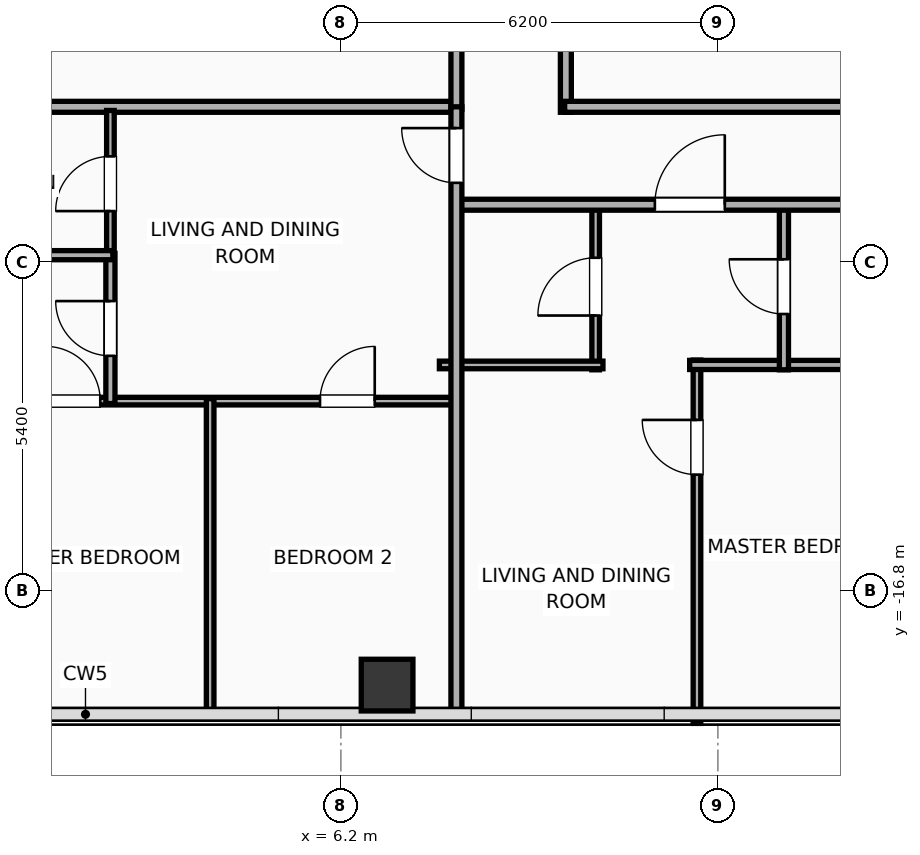
"""IFC4 building model, lengths in metres.
Left out: names, types, materials, properties, quantities, classifications, styles, units other than length and angle.
Written with IfcOpenShell. Run it as: python <this file> out.ifc"""

import sys

from ifc_helpers import new_model, si_unit, direction, frame, frame_2d, origin, origin_2d, place, context, subcontext, project, spatial, rectangle, hollow_rectangle, extrude, element, fill, save


model = new_model("IFC4")
c1 = context("Model", 3, precision=1e-05, world=origin(), true_north=direction((0.0, 1.0)))
c2 = subcontext(c1, "Body", "Model", "MODEL_VIEW")
j1 = project(units=[si_unit("LENGTHUNIT", "METRE"), si_unit("PLANEANGLEUNIT", "RADIAN")], contexts=[c1])
p1 = place(None, origin())
s1 = spatial("IfcSite", under=j1, at=p1, CompositionType="ELEMENT")
p2 = place(p1, origin())
s2 = spatial("IfcBuilding", under=s1, at=p2, CompositionType="ELEMENT")
p3 = place(p2, frame((0.0, 0.0, 204.1)))
s3 = spatial("IfcBuildingStorey", under=s2, at=p3, CompositionType="ELEMENT", Elevation=204.1)
p4 = place(p3, frame((6.96, -18.35, 0.0), z_axis=(0.0, 0.0, 1.0), x_axis=(1.0, 0.0, 0.0)))
e1 = element("IfcColumn", 1, at=p4, inside=s3, PredefinedType="COLUMN", context=c2, shape_type="SweptSolid", body=[
    extrude(hollow_rectangle(XDim=0.85, YDim=0.85, WallThickness=0.028, at=origin_2d()), origin(), (0.0, 0.0, 1.0), 3.9),
])
p5 = place(p3, frame((9.9, -8.93, 0.0), z_axis=(0.0, 0.0, 1.0), x_axis=(0.0, 1.0, 0.0)))
e2 = element("IfcWall", 2, at=p5, inside=s3, PredefinedType="PARTITIONING", context=c2, shape_type="SweptSolid", body=[
    extrude(rectangle(XDim=17.86, YDim=0.18, at=frame_2d((8.93, 0.0))), origin(), (0.0, 0.0, 1.0), 3.65),
])
p6 = place(p5, frame((7.487, 0.0, 0.0)))
e3 = element("IfcOpeningElement", 3, at=p6, cuts=e2, PredefinedType="OPENING", context=c2, shape_type="SweptSolid", body=[
    extrude(rectangle(XDim=1.1, YDim=2.05, at=frame_2d((0.55, 1.025))), frame((0.0, 0.1, 0.0), z_axis=(0.0, -1.0, 0.0), x_axis=(1.0, 0.0, 0.0)), (0.0, 0.0, 1.0), 0.2),
])
p7 = place(p3, frame((9.88, -8.84, 0.0), z_axis=(0.0, 0.0, 1.0), x_axis=(1.0, 0.0, 0.0)))
e4 = element("IfcWall", 4, at=p7, inside=s3, PredefinedType="PARTITIONING", context=c2, shape_type="SweptSolid", body=[
    extrude(rectangle(XDim=20.35, YDim=0.18, at=frame_2d((10.175, 0.0))), origin(), (0.0, 0.0, 1.0), 3.65),
])
p8 = place(p3, frame((-8.15, -8.84, 0.0), z_axis=(0.0, 0.0, 1.0), x_axis=(1.0, 0.0, 0.0)))
e5 = element("IfcWall", 5, at=p8, inside=s3, PredefinedType="PARTITIONING", context=c2, shape_type="SweptSolid", body=[
    extrude(rectangle(XDim=16.3, YDim=0.18, at=frame_2d((8.15, 0.0))), origin(), (0.0, 0.0, 1.0), 3.65),
])
p9 = place(p3, frame((8.1, -8.88, 0.0), z_axis=(0.0, 0.0, 1.0), x_axis=(0.0, 1.0, 0.0)))
e6 = element("IfcWall", 6, at=p9, inside=s3, PredefinedType="PARTITIONING", context=c2, shape_type="SweptSolid", body=[
    extrude(rectangle(XDim=17.76, YDim=0.18, at=frame_2d((8.88, 0.0))), origin(), (0.0, 0.0, 1.0), 3.65),
])
p10 = place(p3, frame((12.056, -18.98, 0.0), z_axis=(0.0, 0.0, 1.0), x_axis=(0.0, 1.0, 0.0)))
e7 = element("IfcWall", 7, at=p10, inside=s3, PredefinedType="PARTITIONING", context=c2, shape_type="SweptSolid", body=[
    extrude(rectangle(XDim=5.975, YDim=0.125, at=frame_2d((2.988, 0.0))), origin(), (0.0, 0.0, 1.0), 3.65),
])
p11 = place(p10, frame((4.091, 0.0, 0.0)))
e8 = element("IfcOpeningElement", 8, at=p11, cuts=e7, PredefinedType="OPENING", context=c2, shape_type="SweptSolid", body=[
    extrude(rectangle(XDim=0.9, YDim=2.05, at=frame_2d((0.45, 1.025))), frame((0.0, 0.073, 0.0), z_axis=(0.0, -1.0, 0.0), x_axis=(1.0, 0.0, 0.0)), (0.0, 0.0, 1.0), 0.145),
])
p12 = place(p3, frame((11.936, -13.085, 0.0), z_axis=(0.0, 0.0, 1.0), x_axis=(1.0, 0.0, 0.0)))
e9 = element("IfcWall", 9, at=p12, inside=s3, PredefinedType="PLUMBINGWALL", context=c2, shape_type="SweptSolid", body=[
    extrude(rectangle(XDim=3.79, YDim=0.15, at=frame_2d((1.895, 0.0))), origin(), (0.0, 0.0, 1.0), 3.65),
])
p13 = place(p3, frame((10.39, -13.165, 0.0), z_axis=(0.0, 0.0, 1.0), x_axis=(0.0, 1.0, 0.0)))
e10 = element("IfcWall", 10, at=p13, inside=s3, PredefinedType="PARTITIONING", context=c2, shape_type="SweptSolid", body=[
    extrude(rectangle(XDim=2.735, YDim=0.125, at=frame_2d((1.368, 0.0))), origin(), (0.0, 0.0, 1.0), 3.65),
])
p14 = place(p13, frame((0.893, 0.0, 0.0)))
e11 = element("IfcOpeningElement", 11, at=p14, cuts=e10, PredefinedType="OPENING", context=c2, shape_type="SweptSolid", body=[
    extrude(rectangle(XDim=0.95, YDim=2.05, at=frame_2d((0.475, 1.025))), frame((0.0, 0.073, 0.0), z_axis=(0.0, -1.0, 0.0), x_axis=(1.0, 0.0, 0.0)), (0.0, 0.0, 1.0), 0.145),
])
p15 = place(p3, frame((7.82, -13.085, 0.0), z_axis=(0.0, 0.0, 1.0), x_axis=(1.0, 0.0, 0.0)))
e12 = element("IfcWall", 12, at=p15, inside=s3, PredefinedType="PARTITIONING", context=c2, shape_type="SweptSolid", body=[
    extrude(rectangle(XDim=2.69, YDim=0.125, at=frame_2d((1.345, 0.0))), origin(), (0.0, 0.0, 1.0), 3.65),
])
p16 = place(p3, frame((13.486, -13.165, 0.0), z_axis=(0.0, 0.0, 1.0), x_axis=(0.0, 1.0, 0.0)))
e13 = element("IfcWall", 13, at=p16, inside=s3, PredefinedType="PLUMBINGWALL", context=c2, shape_type="SweptSolid", body=[
    extrude(rectangle(XDim=2.735, YDim=0.15, at=frame_2d((1.368, 0.0))), origin(), (0.0, 0.0, 1.0), 3.65),
])
p17 = place(p16, frame((0.917, 0.0, 0.0)))
e14 = element("IfcOpeningElement", 14, at=p17, cuts=e13, PredefinedType="OPENING", context=c2, shape_type="SweptSolid", body=[
    extrude(rectangle(XDim=0.9, YDim=2.05, at=frame_2d((0.45, 1.025))), frame((0.0, 0.085, 0.0), z_axis=(0.0, -1.0, 0.0), x_axis=(1.0, 0.0, 0.0)), (0.0, 0.0, 1.0), 0.17),
])
p18 = place(p3, frame((8.08, -10.45, 0.0), z_axis=(0.0, 0.0, 1.0), x_axis=(1.0, 0.0, 0.0)))
e15 = element("IfcWall", 15, at=p18, inside=s3, PredefinedType="PARTITIONING", context=c2, shape_type="SweptSolid", body=[
    extrude(rectangle(XDim=22.15, YDim=0.18, at=frame_2d((11.075, 0.0))), origin(), (0.0, 0.0, 1.0), 3.65),
])
p19 = place(p18, frame((3.283, 0.0, 0.0)))
e16 = element("IfcOpeningElement", 16, at=p19, cuts=e15, PredefinedType="OPENING", context=c2, shape_type="SweptSolid", body=[
    extrude(rectangle(XDim=1.15, YDim=2.05, at=frame_2d((0.575, 1.025))), frame((0.0, 0.1, 0.0), z_axis=(0.0, -1.0, 0.0), x_axis=(1.0, 0.0, 0.0)), (0.0, 0.0, 1.0), 0.2),
])
p20 = place(p18, frame((10.668, 0.0, 0.0)))
e17 = element("IfcOpeningElement", 17, at=p20, cuts=e15, PredefinedType="OPENING", context=c2, shape_type="SweptSolid", body=[
    extrude(rectangle(XDim=1.15, YDim=2.05, at=frame_2d((0.575, 1.025))), frame((0.0, 0.1, 0.0), z_axis=(0.0, -1.0, 0.0), x_axis=(1.0, 0.0, 0.0)), (0.0, 0.0, 1.0), 0.2),
])
p21 = place(p18, frame((18.084, 0.0, 0.0)))
e18 = element("IfcOpeningElement", 18, at=p21, cuts=e15, PredefinedType="OPENING", context=c2, shape_type="SweptSolid", body=[
    extrude(rectangle(XDim=1.15, YDim=2.05, at=frame_2d((0.575, 1.025))), frame((0.0, 0.1, 0.0), z_axis=(0.0, -1.0, 0.0), x_axis=(1.0, 0.0, 0.0)), (0.0, 0.0, 1.0), 0.2),
])
p22 = place(p3, frame((0.02, -13.68, 0.0), z_axis=(0.0, 0.0, 1.0), x_axis=(1.0, 0.0, 0.0)))
e19 = element("IfcWall", 19, at=p22, inside=s3, PredefinedType="PARTITIONING", context=c2, shape_type="SweptSolid", body=[
    extrude(rectangle(XDim=8.06, YDim=0.125, at=frame_2d((4.03, 0.0))), origin(), (0.0, 0.0, 1.0), 3.65),
])
p23 = place(p22, frame((1.323, 0.0, 0.0)))
e20 = element("IfcOpeningElement", 20, at=p23, cuts=e19, PredefinedType="OPENING", context=c2, shape_type="SweptSolid", body=[
    extrude(rectangle(XDim=0.9, YDim=2.05, at=frame_2d((0.45, 1.025))), frame((0.0, 0.073, 0.0), z_axis=(0.0, -1.0, 0.0), x_axis=(1.0, 0.0, 0.0)), (0.0, 0.0, 1.0), 0.145),
])
p24 = place(p22, frame((5.837, 0.0, 0.0)))
e21 = element("IfcOpeningElement", 21, at=p24, cuts=e19, PredefinedType="OPENING", context=c2, shape_type="SweptSolid", body=[
    extrude(rectangle(XDim=0.9, YDim=2.05, at=frame_2d((0.45, 1.025))), frame((0.0, 0.073, 0.0), z_axis=(0.0, -1.0, 0.0), x_axis=(1.0, 0.0, 0.0)), (0.0, 0.0, 1.0), 0.145),
])
p25 = place(p3, frame((2.41, -11.31, 0.0), z_axis=(0.0, 0.0, 1.0), x_axis=(0.0, 1.0, 0.0)))
e22 = element("IfcWall", 22, at=p25, inside=s3, PredefinedType="PARTITIONING", context=c2, shape_type="SweptSolid", body=[
    extrude(rectangle(XDim=2.41, YDim=0.125, at=frame_2d((1.205, 0.0))), origin(), (0.0, 0.0, 1.0), 3.65),
])
p26 = place(p25, frame((0.755, 0.0, 0.0)))
e23 = element("IfcOpeningElement", 23, at=p26, cuts=e22, PredefinedType="OPENING", context=c2, shape_type="SweptSolid", body=[
    extrude(rectangle(XDim=0.9, YDim=2.05, at=frame_2d((0.45, 1.025))), frame((0.0, 0.073, 0.0), z_axis=(0.0, -1.0, 0.0), x_axis=(1.0, 0.0, 0.0)), (0.0, 0.0, 1.0), 0.145),
])
p27 = place(p3, frame((2.41, -13.72, 0.0), z_axis=(0.0, 0.0, 1.0), x_axis=(0.0, 1.0, 0.0)))
e24 = element("IfcWall", 24, at=p27, inside=s3, PredefinedType="PLUMBINGWALL", context=c2, shape_type="SweptSolid", body=[
    extrude(rectangle(XDim=2.47, YDim=0.15, at=frame_2d((1.235, 0.0))), origin(), (0.0, 0.0, 1.0), 3.65),
])
p28 = place(p27, frame((0.785, 0.0, 0.0)))
e25 = element("IfcOpeningElement", 25, at=p28, cuts=e24, PredefinedType="OPENING", context=c2, shape_type="SweptSolid", body=[
    extrude(rectangle(XDim=0.9, YDim=2.05, at=frame_2d((0.45, 1.025))), frame((0.0, 0.085, 0.0), z_axis=(0.0, -1.0, 0.0), x_axis=(1.0, 0.0, 0.0)), (0.0, 0.0, 1.0), 0.17),
])
p29 = place(p3, frame((0.02, -11.28, 0.0), z_axis=(0.0, 0.0, 1.0), x_axis=(1.0, 0.0, 0.0)))
e26 = element("IfcWall", 26, at=p29, inside=s3, PredefinedType="PLUMBINGWALL", context=c2, shape_type="SweptSolid", body=[
    extrude(rectangle(XDim=2.43, YDim=0.15, at=frame_2d((1.215, 0.0))), origin(), (0.0, 0.0, 1.0), 3.65),
])
p30 = place(p3, frame((4.05, -18.83, 0.0), z_axis=(0.0, 0.0, 1.0), x_axis=(0.0, 1.0, 0.0)))
e27 = element("IfcWall", 27, at=p30, inside=s3, PredefinedType="PARTITIONING", context=c2, shape_type="SweptSolid", body=[
    extrude(rectangle(XDim=5.19, YDim=0.125, at=frame_2d((2.595, 0.0))), origin(), (0.0, 0.0, 1.0), 3.65),
])
p31 = place(p3, frame((8.1, -18.83, 0.0), z_axis=(0.0, 0.0, 1.0), x_axis=(0.0, 1.0, 0.0)))
e28 = element("IfcWall", 28, at=p31, inside=s3, PredefinedType="PARTITIONING", context=c2, shape_type="SweptSolid", body=[
    extrude(rectangle(XDim=9.99, YDim=0.18, at=frame_2d((4.995, 0.0))), origin(), (0.0, 0.0, 1.0), 3.65),
])
p32 = place(p31, frame((8.74, 0.0, 0.0)))
e29 = element("IfcOpeningElement", 29, at=p32, cuts=e28, PredefinedType="OPENING", context=c2, shape_type="SweptSolid", body=[
    extrude(rectangle(XDim=0.9, YDim=2.05, at=frame_2d((0.45, 1.025))), frame((0.0, 0.1, 0.0), z_axis=(0.0, -1.0, 0.0), x_axis=(1.0, 0.0, 0.0)), (0.0, 0.0, 1.0), 0.2),
])
p33 = place(p11, origin())
e30 = element("IfcDoor", 30, at=p33, inside=s3, OperationType="SINGLE_SWING_RIGHT", PredefinedType="DOOR", context=c2, shape_type="SweptSolid", body=[
    extrude(rectangle(XDim=0.9, YDim=2.05, at=frame_2d((0.45, 1.025))), frame((0.0, 0.025, 0.0), z_axis=(0.0, -1.0, 0.0), x_axis=(1.0, 0.0, 0.0)), (0.0, 0.0, 1.0), 0.05),
])
fill(e8, e30)
p34 = place(p14, origin())
e31 = element("IfcDoor", 31, at=p34, inside=s3, OperationType="SINGLE_SWING_LEFT", PredefinedType="DOOR", context=c2, shape_type="SweptSolid", body=[
    extrude(rectangle(XDim=0.95, YDim=2.05, at=frame_2d((0.475, 1.025))), frame((0.0, 0.025, 0.0), z_axis=(0.0, -1.0, 0.0), x_axis=(1.0, 0.0, 0.0)), (0.0, 0.0, 1.0), 0.05),
])
fill(e11, e31)
p35 = place(p17, origin())
e32 = element("IfcDoor", 32, at=p35, inside=s3, OperationType="SINGLE_SWING_RIGHT", PredefinedType="DOOR", context=c2, shape_type="SweptSolid", body=[
    extrude(rectangle(XDim=0.9, YDim=2.05, at=frame_2d((0.45, 1.025))), frame((0.0, 0.025, 0.0), z_axis=(0.0, -1.0, 0.0), x_axis=(1.0, 0.0, 0.0)), (0.0, 0.0, 1.0), 0.05),
])
fill(e14, e32)
p36 = place(p19, origin())
e33 = element("IfcDoor", 33, at=p36, inside=s3, OperationType="SINGLE_SWING_RIGHT", PredefinedType="DOOR", context=c2, shape_type="SweptSolid", body=[
    extrude(rectangle(XDim=1.15, YDim=2.05, at=frame_2d((0.575, 1.025))), frame((0.0, 0.025, 0.0), z_axis=(0.0, -1.0, 0.0), x_axis=(1.0, 0.0, 0.0)), (0.0, 0.0, 1.0), 0.05),
])
fill(e16, e33)
p37 = place(p23, origin())
e34 = element("IfcDoor", 34, at=p37, inside=s3, OperationType="SINGLE_SWING_LEFT", PredefinedType="DOOR", context=c2, shape_type="SweptSolid", body=[
    extrude(rectangle(XDim=0.9, YDim=2.05, at=frame_2d((0.45, 1.025))), frame((0.0, 0.025, 0.0), z_axis=(0.0, -1.0, 0.0), x_axis=(1.0, 0.0, 0.0)), (0.0, 0.0, 1.0), 0.05),
])
fill(e20, e34)
p38 = place(p24, origin())
e35 = element("IfcDoor", 35, at=p38, inside=s3, OperationType="SINGLE_SWING_RIGHT", PredefinedType="DOOR", context=c2, shape_type="SweptSolid", body=[
    extrude(rectangle(XDim=0.9, YDim=2.05, at=frame_2d((0.45, 1.025))), frame((0.0, 0.025, 0.0), z_axis=(0.0, -1.0, 0.0), x_axis=(1.0, 0.0, 0.0)), (0.0, 0.0, 1.0), 0.05),
])
fill(e21, e35)
p39 = place(p26, origin())
e36 = element("IfcDoor", 36, at=p39, inside=s3, OperationType="SINGLE_SWING_LEFT", PredefinedType="DOOR", context=c2, shape_type="SweptSolid", body=[
    extrude(rectangle(XDim=0.9, YDim=2.05, at=frame_2d((0.45, 1.025))), frame((0.0, 0.025, 0.0), z_axis=(0.0, -1.0, 0.0), x_axis=(1.0, 0.0, 0.0)), (0.0, 0.0, 1.0), 0.05),
])
fill(e23, e36)
p40 = place(p28, origin())
e37 = element("IfcDoor", 37, at=p40, inside=s3, OperationType="SINGLE_SWING_RIGHT", PredefinedType="DOOR", context=c2, shape_type="SweptSolid", body=[
    extrude(rectangle(XDim=0.9, YDim=2.05, at=frame_2d((0.45, 1.025))), frame((0.0, 0.025, 0.0), z_axis=(0.0, -1.0, 0.0), x_axis=(1.0, 0.0, 0.0)), (0.0, 0.0, 1.0), 0.05),
])
fill(e25, e37)
p41 = place(p32, origin())
e38 = element("IfcDoor", 38, at=p41, inside=s3, OperationType="SINGLE_SWING_RIGHT", PredefinedType="DOOR", context=c2, shape_type="SweptSolid", body=[
    extrude(rectangle(XDim=0.9, YDim=2.05, at=frame_2d((0.45, 1.025))), frame((0.0, 0.025, 0.0), z_axis=(0.0, -1.0, 0.0), x_axis=(1.0, 0.0, 0.0)), (0.0, 0.0, 1.0), 0.05),
])
fill(e29, e38)
save(model, sys.argv[1])
